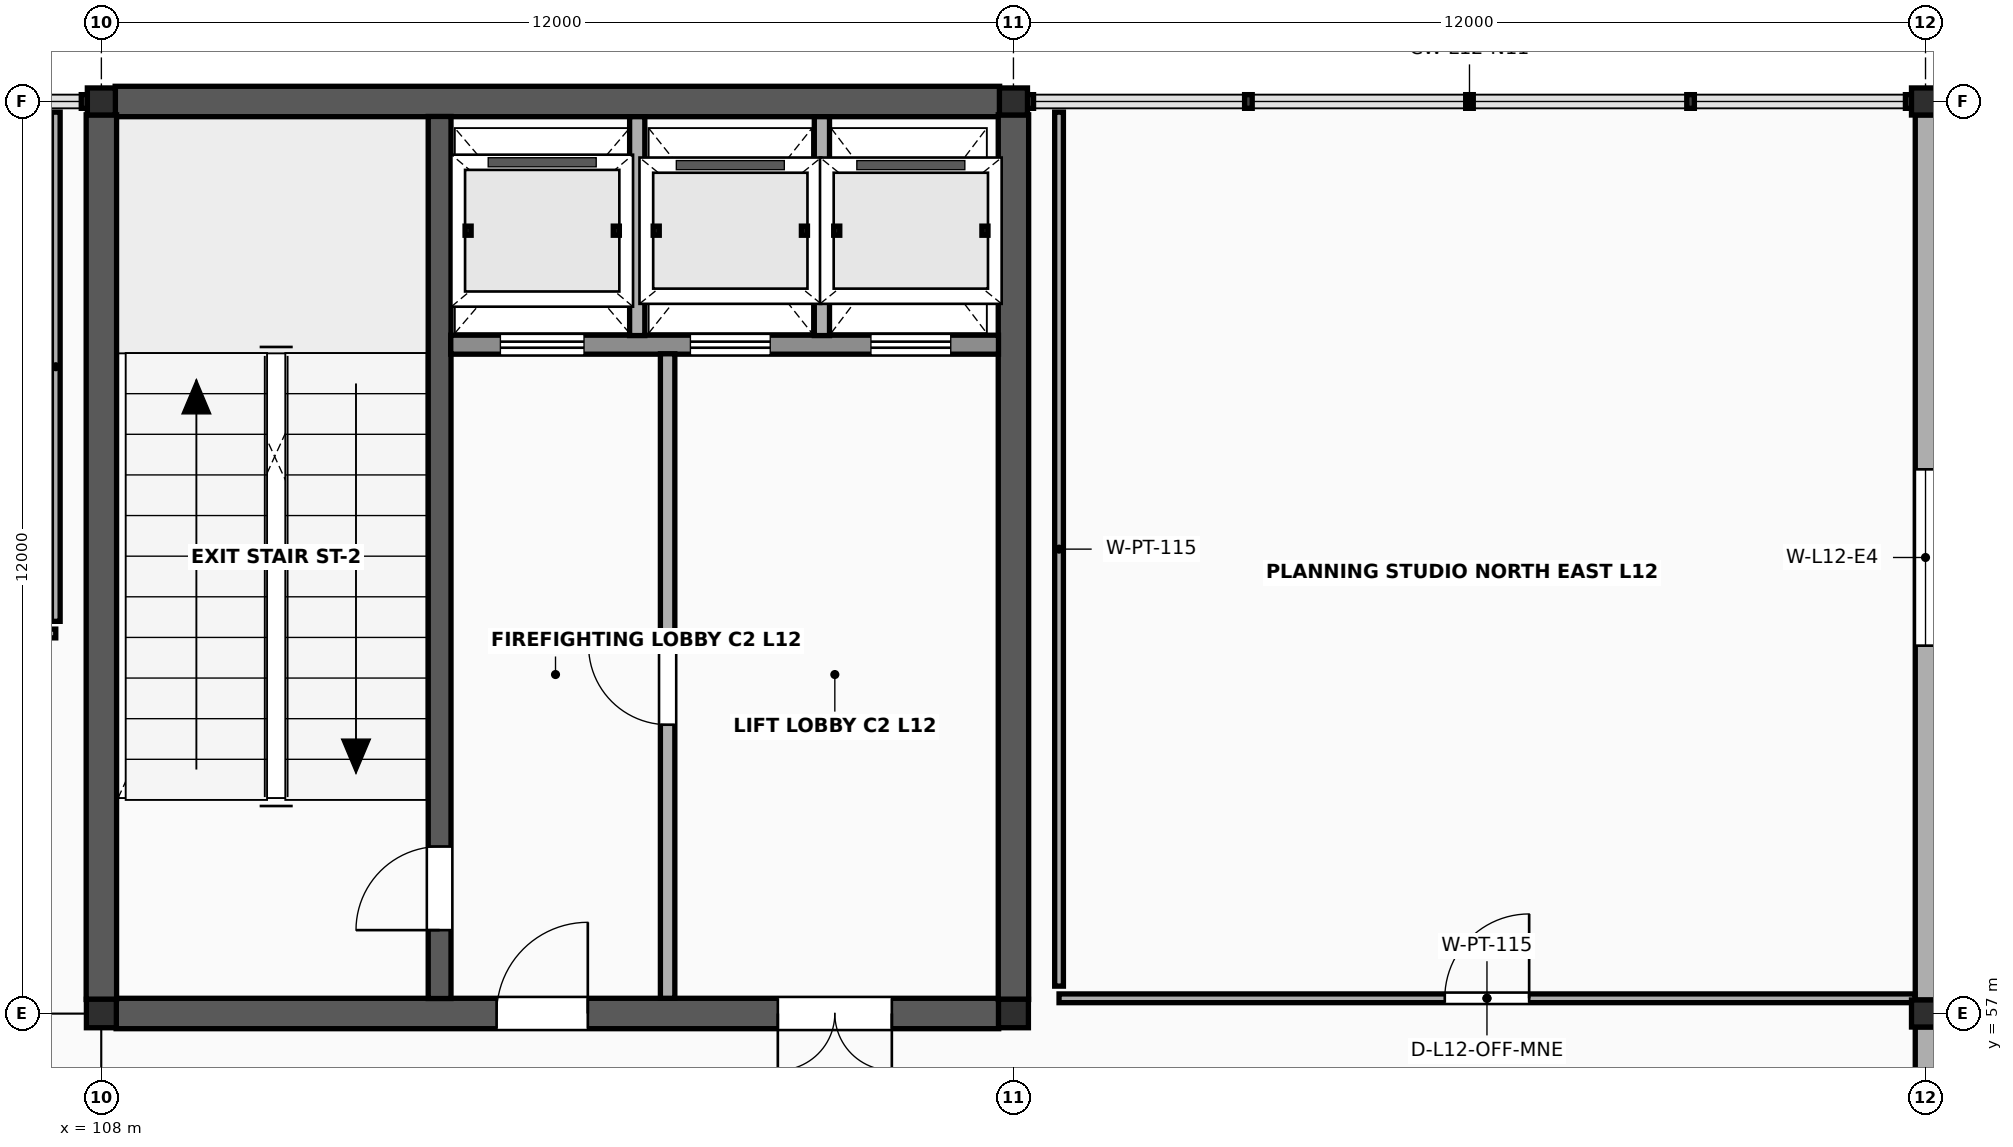
"""IFC4 building model, lengths in metres.
Left out: names, types, materials, properties, quantities, classifications, styles, units other than length and angle.
Written with IfcOpenShell. Run it as: python <this file> out.ifc"""

import sys

from ifc_helpers import new_model, si_unit, direction, frame, frame_2d, origin, origin_2d, place, context, subcontext, project, spatial, rectangle, i_section, extrude, element, fill, save


model = new_model("IFC4")
c1 = context("Model", 3, precision=1e-05, world=origin(), true_north=direction((0.0, 1.0)))
c2 = subcontext(c1, "Body", "Model", "MODEL_VIEW")
j1 = project(units=[si_unit("LENGTHUNIT", "METRE"), si_unit("PLANEANGLEUNIT", "RADIAN")], contexts=[c1])
p1 = place(None, origin())
s1 = spatial("IfcSite", under=j1, at=p1, CompositionType="ELEMENT")
p2 = place(p1, origin())
s2 = spatial("IfcBuilding", under=s1, at=p2, CompositionType="ELEMENT")
p3 = place(p2, frame((0.0, 0.0, 49.6)))
s3 = spatial("IfcBuildingStorey", under=s2, at=p3, CompositionType="ELEMENT", Elevation=49.6)
p4 = place(p3, frame((108.0, 57.0, 0.0), z_axis=(0.0, 0.0, 1.0), x_axis=(1.0, 0.0, 0.0)))
e1 = element("IfcColumn", 1, at=p4, inside=s3, PredefinedType="COLUMN", context=c2, shape_type="SweptSolid", body=[
    extrude(i_section(OverallWidth=0.394, OverallDepth=0.375, WebThickness=0.017, FlangeThickness=0.028, FilletRadius=0.018, at=origin_2d()), origin(), (0.0, 0.0, 1.0), 4.0),
])
p5 = place(p3, frame((108.0, 69.0, 0.0), z_axis=(0.0, 0.0, 1.0), x_axis=(1.0, 0.0, 0.0)))
e2 = element("IfcColumn", 2, at=p5, inside=s3, PredefinedType="COLUMN", context=c2, shape_type="SweptSolid", body=[
    extrude(i_section(OverallWidth=0.369, OverallDepth=0.356, WebThickness=0.011, FlangeThickness=0.018, FilletRadius=0.018, at=origin_2d()), origin(), (0.0, 0.0, 1.0), 4.0),
])
p6 = place(p3, frame((120.0, 57.0, 0.0), z_axis=(0.0, 0.0, 1.0), x_axis=(1.0, 0.0, 0.0)))
e3 = element("IfcColumn", 3, at=p6, inside=s3, PredefinedType="COLUMN", context=c2, shape_type="SweptSolid", body=[
    extrude(i_section(OverallWidth=0.394, OverallDepth=0.375, WebThickness=0.017, FlangeThickness=0.028, FilletRadius=0.018, at=origin_2d()), origin(), (0.0, 0.0, 1.0), 4.0),
])
for number, where, z_axis, x_axis in (
    (4, (120.0, 69.0, 0.0), (0.0, 0.0, 1.0), (1.0, 0.0, 0.0)),
    (5, (132.0, 57.0, 0.0), (0.0, 0.0, 1.0), (1.0, 0.0, 0.0)),
    (6, (132.0, 69.0, 0.0), (0.0, 0.0, 1.0), (1.0, 0.0, 0.0)),
):
    element("IfcColumn", number, at=place(p3, frame(where, z_axis=z_axis, x_axis=x_axis)), inside=s3, PredefinedType="COLUMN", context=c2, shape_type="SweptSolid", body=[
        extrude(i_section(OverallWidth=0.369, OverallDepth=0.356, WebThickness=0.011, FlangeThickness=0.018, FilletRadius=0.018, at=origin_2d()), origin(), (0.0, 0.0, 1.0), 4.0),
    ])
p7 = place(p3, frame((108.194, 57.0, 0.0), z_axis=(0.0, 0.0, 1.0), x_axis=(1.0, 0.0, 0.0)))
e7 = element("IfcWall", 7, at=p7, inside=s3, PredefinedType="SHEAR", context=c2, shape_type="SweptSolid", body=[
    extrude(rectangle(XDim=11.612, YDim=0.4, at=frame_2d((5.806, 0.0))), origin(), (0.0, 0.0, 1.0), 3.848),
])
p8 = place(p7, frame((5.006, 0.0, 0.0)))
e8 = element("IfcOpeningElement", 8, at=p8, cuts=e7, PredefinedType="OPENING", context=c2, shape_type="SweptSolid", body=[
    extrude(rectangle(XDim=1.2, YDim=2.2, at=frame_2d((0.6, 1.1))), frame((0.0, 0.215, 0.0), z_axis=(0.0, -1.0, 0.0), x_axis=(1.0, 0.0, 0.0)), (0.0, 0.0, 1.0), 0.43),
])
p9 = place(p7, frame((8.706, 0.0, 0.0)))
e9 = element("IfcOpeningElement", 9, at=p9, cuts=e7, PredefinedType="OPENING", context=c2, shape_type="SweptSolid", body=[
    extrude(rectangle(XDim=1.5, YDim=2.25, at=frame_2d((0.75, 1.125))), frame((0.0, 0.215, 0.0), z_axis=(0.0, -1.0, 0.0), x_axis=(1.0, 0.0, 0.0)), (0.0, 0.0, 1.0), 0.43),
])
p10 = place(p3, frame((108.181, 69.0, 0.0), z_axis=(0.0, 0.0, 1.0), x_axis=(1.0, 0.0, 0.0)))
e10 = element("IfcWall", 10, at=p10, inside=s3, PredefinedType="SHEAR", context=c2, shape_type="SweptSolid", body=[
    extrude(rectangle(XDim=11.637, YDim=0.4, at=frame_2d((5.819, 0.0))), origin(), (0.0, 0.0, 1.0), 3.848),
])
for number, where, z_axis, x_axis in (
    (11, (108.0, 57.185, 0.0), (0.0, 0.0, 1.0), (0.0, 1.0, 0.0)),
    (12, (120.0, 57.185, 0.0), (0.0, 0.0, 1.0), (0.0, 1.0, 0.0)),
):
    element("IfcWall", number, at=place(p3, frame(where, z_axis=z_axis, x_axis=x_axis)), inside=s3, PredefinedType="SHEAR", context=c2, shape_type="SweptSolid", body=[
        extrude(rectangle(XDim=11.64, YDim=0.4, at=frame_2d((5.82, 0.0))), origin(), (0.0, 0.0, 1.0), 3.848),
    ])
p11 = place(p3, frame((112.45, 57.197, 0.0), z_axis=(0.0, 0.0, 1.0), x_axis=(0.0, 1.0, 0.0)))
e13 = element("IfcWall", 13, at=p11, inside=s3, PredefinedType="SHEAR", context=c2, shape_type="SweptSolid", body=[
    extrude(rectangle(XDim=11.606, YDim=0.3, at=frame_2d((5.803, 0.0))), origin(), (0.0, 0.0, 1.0), 3.848),
])
p12 = place(p11, frame((0.9, 0.0, 0.0)))
e14 = element("IfcOpeningElement", 14, at=p12, cuts=e13, PredefinedType="OPENING", context=c2, shape_type="SweptSolid", body=[
    extrude(rectangle(XDim=1.1, YDim=2.2, at=frame_2d((0.55, 1.1))), frame((0.0, 0.165, 0.0), z_axis=(0.0, -1.0, 0.0), x_axis=(1.0, 0.0, 0.0)), (0.0, 0.0, 1.0), 0.33),
])
p13 = place(p3, frame((112.597, 65.8, 0.0), z_axis=(0.0, 0.0, 1.0), x_axis=(1.0, 0.0, 0.0)))
e15 = element("IfcWall", 15, at=p13, inside=s3, PredefinedType="SOLIDWALL", context=c2, shape_type="SweptSolid", body=[
    extrude(rectangle(XDim=7.206, YDim=0.25, at=frame_2d((3.603, 0.0))), origin(), (0.0, 0.0, 1.0), 3.848),
])
p14 = place(p13, frame((0.653, 0.0, 0.0)))
e16 = element("IfcOpeningElement", 16, at=p14, cuts=e15, PredefinedType="OPENING", context=c2, shape_type="SweptSolid", body=[
    extrude(rectangle(XDim=1.1, YDim=2.24, at=frame_2d((0.55, 1.12))), frame((0.0, 0.14, 0.0), z_axis=(0.0, -1.0, 0.0), x_axis=(1.0, 0.0, 0.0)), (0.0, 0.0, 1.0), 0.28),
])
p15 = place(p13, frame((3.153, 0.0, 0.0)))
e17 = element("IfcOpeningElement", 17, at=p15, cuts=e15, PredefinedType="OPENING", context=c2, shape_type="SweptSolid", body=[
    extrude(rectangle(XDim=1.05, YDim=2.2, at=frame_2d((0.525, 1.1))), frame((0.0, 0.14, 0.0), z_axis=(0.0, -1.0, 0.0), x_axis=(1.0, 0.0, 0.0)), (0.0, 0.0, 1.0), 0.28),
])
p16 = place(p13, frame((5.528, 0.0, 0.0)))
e18 = element("IfcOpeningElement", 18, at=p16, cuts=e15, PredefinedType="OPENING", context=c2, shape_type="SweptSolid", body=[
    extrude(rectangle(XDim=1.05, YDim=2.2, at=frame_2d((0.525, 1.1))), frame((0.0, 0.14, 0.0), z_axis=(0.0, -1.0, 0.0), x_axis=(1.0, 0.0, 0.0)), (0.0, 0.0, 1.0), 0.28),
])
for number, where, z_axis, x_axis in (
    (19, (115.05, 65.92, 0.0), (0.0, 0.0, 1.0), (0.0, 1.0, 0.0)),
    (20, (117.48, 65.92, 0.0), (0.0, 0.0, 1.0), (0.0, 1.0, 0.0)),
):
    element("IfcWall", number, at=place(p3, frame(where, z_axis=z_axis, x_axis=x_axis)), inside=s3, PredefinedType="SOLIDWALL", context=c2, shape_type="SweptSolid", body=[
        extrude(rectangle(XDim=2.88, YDim=0.2, at=frame_2d((1.44, 0.0))), origin(), (0.0, 0.0, 1.0), 3.838),
    ])
p17 = place(p3, frame((115.45, 57.2, 0.0), z_axis=(0.0, 0.0, 1.0), x_axis=(0.0, 1.0, 0.0)))
e21 = element("IfcWall", 21, at=p17, inside=s3, PredefinedType="SOLIDWALL", context=c2, shape_type="SweptSolid", body=[
    extrude(rectangle(XDim=8.48, YDim=0.19, at=frame_2d((4.24, 0.0))), origin(), (0.0, 0.0, 1.0), 3.838),
])
p18 = place(p17, frame((3.6, 0.0, 0.0)))
e22 = element("IfcOpeningElement", 22, at=p18, cuts=e21, PredefinedType="OPENING", context=c2, shape_type="SweptSolid", body=[
    extrude(rectangle(XDim=1.04, YDim=2.18, at=frame_2d((0.52, 1.09))), frame((0.0, 0.11, 0.0), z_axis=(0.0, -1.0, 0.0), x_axis=(1.0, 0.0, 0.0)), (0.0, 0.0, 1.0), 0.22),
])
p19 = place(p3, frame((132.0, 45.176, 0.0), z_axis=(0.0, 0.0, 1.0), x_axis=(0.0, 1.0, 0.0)))
e23 = element("IfcWall", 23, at=p19, inside=s3, PredefinedType="SOLIDWALL", context=c2, shape_type="SweptSolid", body=[
    extrude(rectangle(XDim=11.648, YDim=0.27, at=frame_2d((5.824, 0.0))), origin(), (0.0, 0.0, 1.0), 3.301),
])
p20 = place(p19, frame((4.744, 0.0, 0.78)))
e24 = element("IfcOpeningElement", 24, at=p20, cuts=e23, PredefinedType="OPENING", context=c2, shape_type="SweptSolid", body=[
    extrude(rectangle(XDim=2.16, YDim=1.42, at=frame_2d((1.08, 0.71))), frame((0.0, 0.15, 0.0), z_axis=(0.0, -1.0, 0.0), x_axis=(1.0, 0.0, 0.0)), (0.0, 0.0, 1.0), 0.3),
])
p21 = place(p3, frame((132.0, 57.176, 0.0), z_axis=(0.0, 0.0, 1.0), x_axis=(0.0, 1.0, 0.0)))
e25 = element("IfcWall", 25, at=p21, inside=s3, PredefinedType="SOLIDWALL", context=c2, shape_type="SweptSolid", body=[
    extrude(rectangle(XDim=11.648, YDim=0.27, at=frame_2d((5.824, 0.0))), origin(), (0.0, 0.0, 1.0), 3.301),
])
p22 = place(p21, frame((4.664, 0.0, 0.78)))
e26 = element("IfcOpeningElement", 26, at=p22, cuts=e25, PredefinedType="OPENING", context=c2, shape_type="SweptSolid", body=[
    extrude(rectangle(XDim=2.32, YDim=1.42, at=frame_2d((1.16, 0.71))), frame((0.0, 0.15, 0.0), z_axis=(0.0, -1.0, 0.0), x_axis=(1.0, 0.0, 0.0)), (0.0, 0.0, 1.0), 0.3),
])
p23 = place(p3, frame((73.0, 62.0, 0.0), z_axis=(0.0, 0.0, 1.0), x_axis=(1.0, 0.0, 0.0)))
e27 = element("IfcWall", 27, at=p23, inside=s3, PredefinedType="PARTITIONING", context=c2, shape_type="SweptSolid", body=[
    extrude(rectangle(XDim=34.4, YDim=0.115, at=frame_2d((17.2, 0.0))), origin(), (0.0, 0.0, 1.0), 2.88),
])
p24 = place(p23, frame((16.51, 0.0, 0.0)))
e28 = element("IfcOpeningElement", 28, at=p24, cuts=e27, PredefinedType="OPENING", context=c2, shape_type="SweptSolid", body=[
    extrude(rectangle(XDim=1.38, YDim=2.23, at=frame_2d((0.69, 1.115))), frame((0.0, 0.073, 0.0), z_axis=(0.0, -1.0, 0.0), x_axis=(1.0, 0.0, 0.0)), (0.0, 0.0, 1.0), 0.145),
])
p25 = place(p3, frame((107.4, 62.16, 0.0), z_axis=(0.0, 0.0, 1.0), x_axis=(0.0, 1.0, 0.0)))
e29 = element("IfcWall", 29, at=p25, inside=s3, PredefinedType="PARTITIONING", context=c2, shape_type="SweptSolid", body=[
    extrude(rectangle(XDim=6.7, YDim=0.115, at=frame_2d((3.35, 0.0))), origin(), (0.0, 0.0, 1.0), 2.88),
])
p26 = place(p3, frame((120.6, 57.2, 0.0), z_axis=(0.0, 0.0, 1.0), x_axis=(1.0, 0.0, 0.0)))
e30 = element("IfcWall", 30, at=p26, inside=s3, PredefinedType="PARTITIONING", context=c2, shape_type="SweptSolid", body=[
    extrude(rectangle(XDim=11.26, YDim=0.115, at=frame_2d((5.63, 0.0))), origin(), (0.0, 0.0, 1.0), 2.88),
])
p27 = place(p26, frame((5.075, 0.0, 0.0)))
e31 = element("IfcOpeningElement", 31, at=p27, cuts=e30, PredefinedType="OPENING", context=c2, shape_type="SweptSolid", body=[
    extrude(rectangle(XDim=1.11, YDim=2.21, at=frame_2d((0.555, 1.105))), frame((0.0, 0.073, 0.0), z_axis=(0.0, -1.0, 0.0), x_axis=(1.0, 0.0, 0.0)), (0.0, 0.0, 1.0), 0.145),
])
p28 = place(p3, frame((120.6, 57.36, 0.0), z_axis=(0.0, 0.0, 1.0), x_axis=(0.0, 1.0, 0.0)))
e32 = element("IfcWall", 32, at=p28, inside=s3, PredefinedType="PARTITIONING", context=c2, shape_type="SweptSolid", body=[
    extrude(rectangle(XDim=11.5, YDim=0.115, at=frame_2d((5.75, 0.0))), origin(), (0.0, 0.0, 1.0), 2.88),
])
p29 = place(p22, origin())
e33 = element("IfcWindow", 33, at=p29, inside=s3, PartitioningType="DOUBLE_PANEL_VERTICAL", PredefinedType="WINDOW", context=c2, shape_type="SweptSolid", body=[
    extrude(rectangle(XDim=2.32, YDim=1.42, at=frame_2d((1.16, 0.71))), frame((0.0, 0.03, 0.0), z_axis=(0.0, -1.0, 0.0), x_axis=(1.0, 0.0, 0.0)), (0.0, 0.0, 1.0), 0.06),
])
fill(e26, e33)
p30 = place(p12, origin())
e34 = element("IfcDoor", 34, at=p30, inside=s3, OperationType="SINGLE_SWING_LEFT", PredefinedType="DOOR", context=c2, shape_type="SweptSolid", body=[
    extrude(rectangle(XDim=1.1, YDim=2.2, at=frame_2d((0.55, 1.1))), frame((0.0, 0.025, 0.0), z_axis=(0.0, -1.0, 0.0), x_axis=(1.0, 0.0, 0.0)), (0.0, 0.0, 1.0), 0.05),
])
fill(e14, e34)
p31 = place(p18, origin())
e35 = element("IfcDoor", 35, at=p31, inside=s3, OperationType="SINGLE_SWING_RIGHT", PredefinedType="DOOR", context=c2, shape_type="SweptSolid", body=[
    extrude(rectangle(XDim=1.04, YDim=2.18, at=frame_2d((0.52, 1.09))), frame((0.0, 0.025, 0.0), z_axis=(0.0, -1.0, 0.0), x_axis=(1.0, 0.0, 0.0)), (0.0, 0.0, 1.0), 0.05),
])
fill(e22, e35)
p32 = place(p8, origin())
e36 = element("IfcDoor", 36, at=p32, inside=s3, OperationType="SINGLE_SWING_RIGHT", PredefinedType="DOOR", context=c2, shape_type="SweptSolid", body=[
    extrude(rectangle(XDim=1.2, YDim=2.2, at=frame_2d((0.6, 1.1))), frame((0.0, 0.025, 0.0), z_axis=(0.0, -1.0, 0.0), x_axis=(1.0, 0.0, 0.0)), (0.0, 0.0, 1.0), 0.05),
])
fill(e8, e36)
p33 = place(p9, origin())
e37 = element("IfcDoor", 37, at=p33, inside=s3, OperationType="DOUBLE_DOOR_SINGLE_SWING", PredefinedType="DOOR", context=c2, shape_type="SweptSolid", body=[
    extrude(rectangle(XDim=1.5, YDim=2.25, at=frame_2d((0.75, 1.125))), frame((0.0, 0.025, 0.0), z_axis=(0.0, -1.0, 0.0), x_axis=(1.0, 0.0, 0.0)), (0.0, 0.0, 1.0), 0.05),
])
fill(e9, e37)
p34 = place(p14, origin())
e38 = element("IfcDoor", 38, at=p34, inside=s3, OperationType="SLIDING_TO_LEFT", PredefinedType="USERDEFINED", context=c2, shape_type="SweptSolid", body=[
    extrude(rectangle(XDim=1.1, YDim=2.24, at=frame_2d((0.55, 1.12))), frame((0.0, 0.025, 0.0), z_axis=(0.0, -1.0, 0.0), x_axis=(1.0, 0.0, 0.0)), (0.0, 0.0, 1.0), 0.05),
])
fill(e16, e38)
p35 = place(p15, origin())
e39 = element("IfcDoor", 39, at=p35, inside=s3, OperationType="SLIDING_TO_LEFT", PredefinedType="USERDEFINED", context=c2, shape_type="SweptSolid", body=[
    extrude(rectangle(XDim=1.05, YDim=2.2, at=frame_2d((0.525, 1.1))), frame((0.0, 0.025, 0.0), z_axis=(0.0, -1.0, 0.0), x_axis=(1.0, 0.0, 0.0)), (0.0, 0.0, 1.0), 0.05),
])
fill(e17, e39)
p36 = place(p16, origin())
e40 = element("IfcDoor", 40, at=p36, inside=s3, OperationType="SLIDING_TO_LEFT", PredefinedType="USERDEFINED", context=c2, shape_type="SweptSolid", body=[
    extrude(rectangle(XDim=1.05, YDim=2.2, at=frame_2d((0.525, 1.1))), frame((0.0, 0.025, 0.0), z_axis=(0.0, -1.0, 0.0), x_axis=(1.0, 0.0, 0.0)), (0.0, 0.0, 1.0), 0.05),
])
fill(e18, e40)
p37 = place(p27, origin())
e41 = element("IfcDoor", 41, at=p37, inside=s3, OperationType="SINGLE_SWING_RIGHT", PredefinedType="DOOR", context=c2, shape_type="SweptSolid", body=[
    extrude(rectangle(XDim=1.11, YDim=2.21, at=frame_2d((0.555, 1.105))), frame((0.0, 0.025, 0.0), z_axis=(0.0, -1.0, 0.0), x_axis=(1.0, 0.0, 0.0)), (0.0, 0.0, 1.0), 0.05),
])
fill(e31, e41)
save(model, sys.argv[1])
